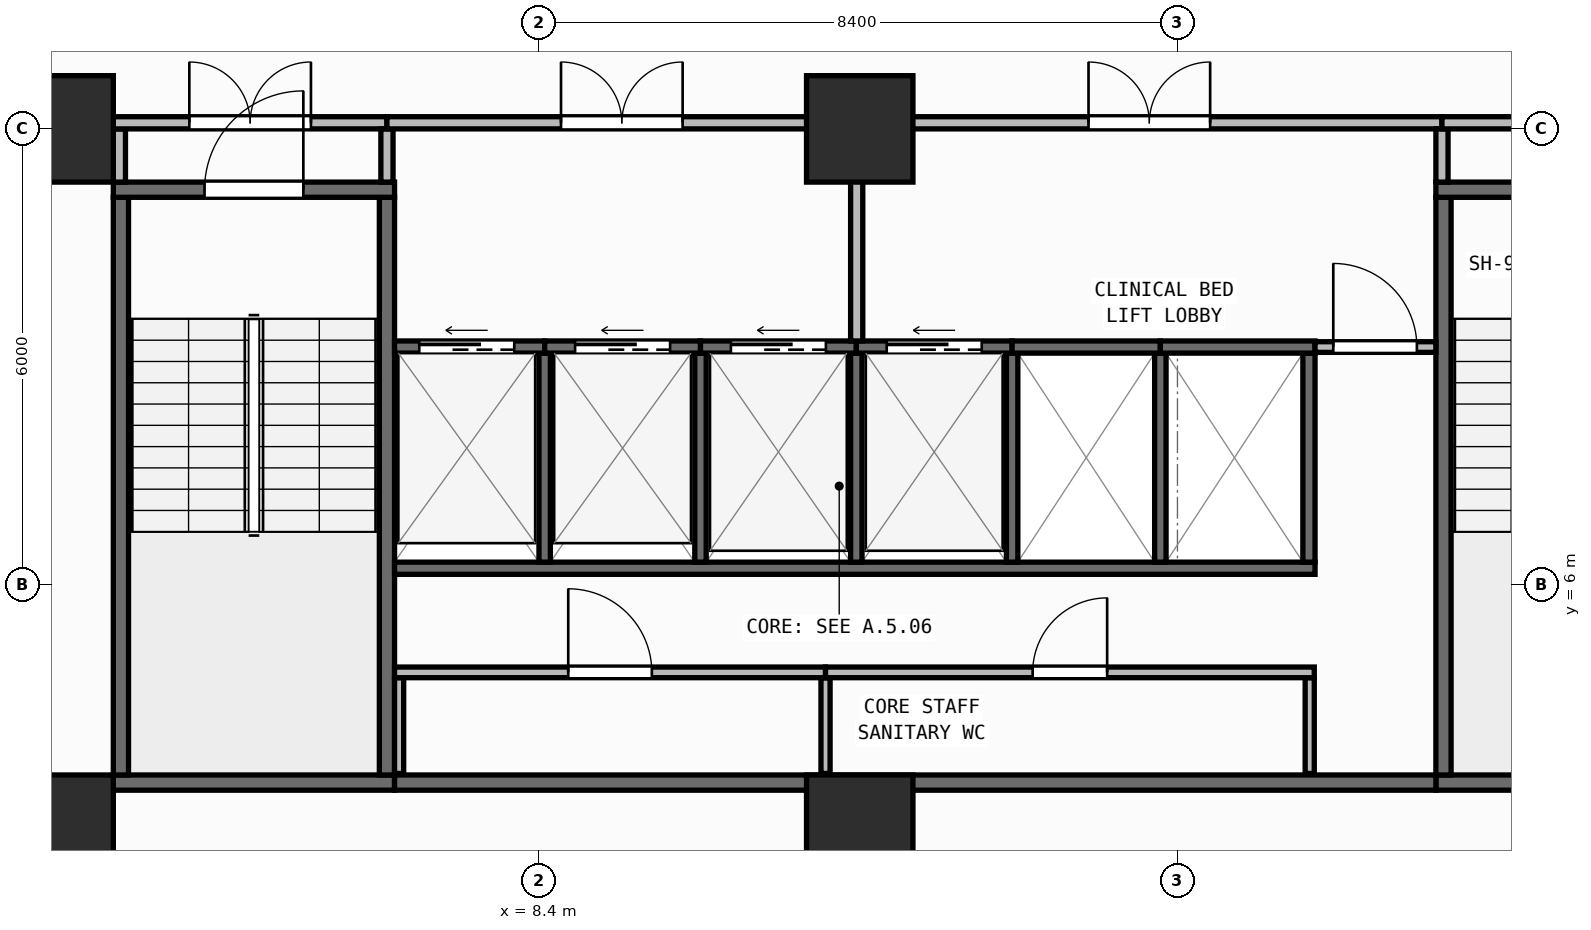
"""IFC4 building model, lengths in metres.
Left out: names, types, materials, properties, quantities, classifications, styles, units other than length and angle.
Written with IfcOpenShell. Run it as: python <this file> out.ifc"""

import sys

from ifc_helpers import new_model, si_unit, direction, frame, frame_2d, origin, origin_2d, place, context, subcontext, project, spatial, rectangle, extrude, element, fill, save


model = new_model("IFC4")
c1 = context("Model", 3, precision=1e-05, world=origin(), true_north=direction((0.0, 1.0)))
c2 = subcontext(c1, "Body", "Model", "MODEL_VIEW")
j1 = project(units=[si_unit("LENGTHUNIT", "METRE"), si_unit("PLANEANGLEUNIT", "RADIAN")], contexts=[c1])
p1 = place(None, origin())
s1 = spatial("IfcSite", under=j1, at=p1, CompositionType="ELEMENT")
p2 = place(p1, origin())
s2 = spatial("IfcBuilding", under=s1, at=p2, CompositionType="ELEMENT")
p3 = place(p2, frame((0.0, 0.0, 50.15)))
s3 = spatial("IfcBuildingStorey", under=s2, at=p3, CompositionType="ELEMENT", Elevation=50.15)
for number, where, z_axis, x_axis in (
    (1, (2.1, 2.8, 0.0), (0.0, 0.0, 1.0), (1.0, 0.0, 0.0)),
    (2, (12.62, 2.8, 0.0), (0.0, 0.0, 1.0), (1.0, 0.0, 0.0)),
    (3, (2.1, 12.0, 0.0), (0.0, 0.0, 1.0), (1.0, 0.0, 0.0)),
    (4, (12.62, 12.0, 0.0), (0.0, 0.0, 1.0), (1.0, 0.0, 0.0)),
):
    element("IfcColumn", number, at=place(p3, frame(where, z_axis=z_axis, x_axis=x_axis)), inside=s3, PredefinedType="COLUMN", context=c2, shape_type="SweptSolid", body=[
        extrude(rectangle(XDim=1.4, YDim=1.4, at=origin_2d()), origin(), (0.0, 0.0, 1.0), 3.95),
    ])
p4 = place(p3, frame((2.76, 0.174, 0.0), z_axis=(0.0, 0.0, 1.0), x_axis=(0.996571478456, 0.082736257641, 0.0)))
e5 = element("IfcWall", 5, at=p4, inside=s3, PredefinedType="STANDARD", context=c2, shape_type="SweptSolid", body=[
    extrude(rectangle(XDim=52.861, YDim=0.26, at=frame_2d((26.431, 0.0))), origin(), (0.0, 0.0, 1.0), 3.71),
])
p5 = place(p4, frame((25.231, 0.0, 0.9)))
e6 = element("IfcOpeningElement", 6, at=p5, cuts=e5, PredefinedType="OPENING", context=c2, shape_type="SweptSolid", body=[
    extrude(rectangle(XDim=2.4, YDim=1.65, at=frame_2d((1.2, 0.825))), frame((0.0, 0.14, 0.0), z_axis=(0.0, -1.0, 0.0), x_axis=(1.0, 0.0, 0.0)), (0.0, 0.0, 1.0), 0.28),
])
p6 = place(p3, frame((2.8, 3.4, 0.0), z_axis=(0.0, 0.0, 1.0), x_axis=(1.0, 0.0, 0.0)))
e7 = element("IfcWall", 7, at=p6, inside=s3, PredefinedType="SHEAR", context=c2, shape_type="SweptSolid", body=[
    extrude(rectangle(XDim=3.7, YDim=0.2, at=frame_2d((1.85, 0.0))), origin(), (0.0, 0.0, 1.0), 3.71),
])
for number, where, z_axis, x_axis in (
    (8, (2.9, 3.5, 0.0), (0.0, 0.0, 1.0), (0.0, 1.0, 0.0)),
    (9, (6.4, 3.5, 0.0), (0.0, 0.0, 1.0), (0.0, 1.0, 0.0)),
):
    element("IfcWall", number, at=place(p3, frame(where, z_axis=z_axis, x_axis=x_axis)), inside=s3, PredefinedType="SHEAR", context=c2, shape_type="SweptSolid", body=[
        extrude(rectangle(XDim=7.6, YDim=0.2, at=frame_2d((3.8, 0.0))), origin(), (0.0, 0.0, 1.0), 3.71),
    ])
p7 = place(p3, frame((2.8, 11.2, 0.0), z_axis=(0.0, 0.0, 1.0), x_axis=(1.0, 0.0, 0.0)))
e10 = element("IfcWall", 10, at=p7, inside=s3, PredefinedType="SHEAR", context=c2, shape_type="SweptSolid", body=[
    extrude(rectangle(XDim=3.7, YDim=0.2, at=frame_2d((1.85, 0.0))), origin(), (0.0, 0.0, 1.0), 3.71),
])
p8 = place(p7, frame((1.2, 0.0, 0.0)))
e11 = element("IfcOpeningElement", 11, at=p8, cuts=e10, PredefinedType="OPENING", context=c2, shape_type="SweptSolid", body=[
    extrude(rectangle(XDim=1.3, YDim=2.15, at=frame_2d((0.65, 1.075))), frame((0.0, 0.11, 0.0), z_axis=(0.0, -1.0, 0.0), x_axis=(1.0, 0.0, 0.0)), (0.0, 0.0, 1.0), 0.22),
])
p9 = place(p3, frame((20.2, 3.4, 0.0), z_axis=(0.0, 0.0, 1.0), x_axis=(1.0, 0.0, 0.0)))
e12 = element("IfcWall", 12, at=p9, inside=s3, PredefinedType="SHEAR", context=c2, shape_type="SweptSolid", body=[
    extrude(rectangle(XDim=3.7, YDim=0.2, at=frame_2d((1.85, 0.0))), origin(), (0.0, 0.0, 1.0), 3.71),
])
p10 = place(p3, frame((20.3, 3.5, 0.0), z_axis=(0.0, 0.0, 1.0), x_axis=(0.0, 1.0, 0.0)))
e13 = element("IfcWall", 13, at=p10, inside=s3, PredefinedType="SHEAR", context=c2, shape_type="SweptSolid", body=[
    extrude(rectangle(XDim=7.6, YDim=0.2, at=frame_2d((3.8, 0.0))), origin(), (0.0, 0.0, 1.0), 3.71),
])
p11 = place(p3, frame((20.2, 11.2, 0.0), z_axis=(0.0, 0.0, 1.0), x_axis=(1.0, 0.0, 0.0)))
e14 = element("IfcWall", 14, at=p11, inside=s3, PredefinedType="SHEAR", context=c2, shape_type="SweptSolid", body=[
    extrude(rectangle(XDim=3.7, YDim=0.2, at=frame_2d((1.85, 0.0))), origin(), (0.0, 0.0, 1.0), 3.71),
])
p12 = place(p11, frame((1.2, 0.0, 0.0)))
e15 = element("IfcOpeningElement", 15, at=p12, cuts=e14, PredefinedType="OPENING", context=c2, shape_type="SweptSolid", body=[
    extrude(rectangle(XDim=1.3, YDim=2.15, at=frame_2d((0.65, 1.075))), frame((0.0, 0.11, 0.0), z_axis=(0.0, -1.0, 0.0), x_axis=(1.0, 0.0, 0.0)), (0.0, 0.0, 1.0), 0.22),
])
p13 = place(p3, frame((6.5, 3.4, 0.0), z_axis=(0.0, 0.0, 1.0), x_axis=(1.0, 0.0, 0.0)))
e16 = element("IfcWall", 16, at=p13, inside=s3, PredefinedType="SHEAR", context=c2, shape_type="SweptSolid", body=[
    extrude(rectangle(XDim=13.7, YDim=0.2, at=frame_2d((6.85, 0.0))), origin(), (0.0, 0.0, 1.0), 3.71),
])
p14 = place(p3, frame((6.5, 6.22, 0.0), z_axis=(0.0, 0.0, 1.0), x_axis=(1.0, 0.0, 0.0)))
e17 = element("IfcWall", 17, at=p14, inside=s3, PredefinedType="SHEAR", context=c2, shape_type="SweptSolid", body=[
    extrude(rectangle(XDim=12.11, YDim=0.16, at=frame_2d((6.055, 0.0))), origin(), (0.0, 0.0, 1.0), 3.71),
])
p15 = place(p3, frame((18.53, 6.3, 0.0), z_axis=(0.0, 0.0, 1.0), x_axis=(0.0, 1.0, 0.0)))
e18 = element("IfcWall", 18, at=p15, inside=s3, PredefinedType="SHEAR", context=c2, shape_type="SweptSolid", body=[
    extrude(rectangle(XDim=2.75, YDim=0.16, at=frame_2d((1.375, 0.0))), origin(), (0.0, 0.0, 1.0), 3.71),
])
for number, where, z_axis, x_axis in (
    (19, (8.475, 6.3, 0.0), (0.0, 0.0, 1.0), (0.0, 1.0, 0.0)),
    (20, (10.525, 6.3, 0.0), (0.0, 0.0, 1.0), (0.0, 1.0, 0.0)),
    (21, (12.575, 6.3, 0.0), (0.0, 0.0, 1.0), (0.0, 1.0, 0.0)),
    (22, (14.625, 6.3, 0.0), (0.0, 0.0, 1.0), (0.0, 1.0, 0.0)),
    (23, (16.575, 6.3, 0.0), (0.0, 0.0, 1.0), (0.0, 1.0, 0.0)),
):
    element("IfcWall", number, at=place(p3, frame(where, z_axis=z_axis, x_axis=x_axis)), inside=s3, PredefinedType="SHEAR", context=c2, shape_type="SweptSolid", body=[
        extrude(rectangle(XDim=2.75, YDim=0.15, at=frame_2d((1.375, 0.0))), origin(), (0.0, 0.0, 1.0), 3.71),
    ])
p16 = place(p3, frame((6.5, 9.13, 0.0), z_axis=(0.0, 0.0, 1.0), x_axis=(1.0, 0.0, 0.0)))
e24 = element("IfcWall", 24, at=p16, inside=s3, PredefinedType="SHEAR", context=c2, shape_type="SweptSolid", body=[
    extrude(rectangle(XDim=1.975, YDim=0.16, at=frame_2d((0.988, 0.0))), origin(), (0.0, 0.0, 1.0), 3.71),
])
p17 = place(p16, frame((0.325, 0.0, 0.0)))
e25 = element("IfcOpeningElement", 25, at=p17, cuts=e24, PredefinedType="OPENING", context=c2, shape_type="SweptSolid", body=[
    extrude(rectangle(XDim=1.25, YDim=2.15, at=frame_2d((0.625, 1.075))), frame((0.0, 0.09, 0.0), z_axis=(0.0, -1.0, 0.0), x_axis=(1.0, 0.0, 0.0)), (0.0, 0.0, 1.0), 0.18),
])
p18 = place(p3, frame((8.475, 9.13, 0.0), z_axis=(0.0, 0.0, 1.0), x_axis=(1.0, 0.0, 0.0)))
e26 = element("IfcWall", 26, at=p18, inside=s3, PredefinedType="SHEAR", context=c2, shape_type="SweptSolid", body=[
    extrude(rectangle(XDim=2.05, YDim=0.16, at=frame_2d((1.025, 0.0))), origin(), (0.0, 0.0, 1.0), 3.71),
])
p19 = place(p18, frame((0.4, 0.0, 0.0)))
e27 = element("IfcOpeningElement", 27, at=p19, cuts=e26, PredefinedType="OPENING", context=c2, shape_type="SweptSolid", body=[
    extrude(rectangle(XDim=1.25, YDim=2.15, at=frame_2d((0.625, 1.075))), frame((0.0, 0.09, 0.0), z_axis=(0.0, -1.0, 0.0), x_axis=(1.0, 0.0, 0.0)), (0.0, 0.0, 1.0), 0.18),
])
p20 = place(p3, frame((10.525, 9.13, 0.0), z_axis=(0.0, 0.0, 1.0), x_axis=(1.0, 0.0, 0.0)))
e28 = element("IfcWall", 28, at=p20, inside=s3, PredefinedType="SHEAR", context=c2, shape_type="SweptSolid", body=[
    extrude(rectangle(XDim=2.05, YDim=0.16, at=frame_2d((1.025, 0.0))), origin(), (0.0, 0.0, 1.0), 3.71),
])
p21 = place(p20, frame((0.4, 0.0, 0.0)))
e29 = element("IfcOpeningElement", 29, at=p21, cuts=e28, PredefinedType="OPENING", context=c2, shape_type="SweptSolid", body=[
    extrude(rectangle(XDim=1.25, YDim=2.15, at=frame_2d((0.625, 1.075))), frame((0.0, 0.09, 0.0), z_axis=(0.0, -1.0, 0.0), x_axis=(1.0, 0.0, 0.0)), (0.0, 0.0, 1.0), 0.18),
])
p22 = place(p3, frame((12.575, 9.13, 0.0), z_axis=(0.0, 0.0, 1.0), x_axis=(1.0, 0.0, 0.0)))
e30 = element("IfcWall", 30, at=p22, inside=s3, PredefinedType="SHEAR", context=c2, shape_type="SweptSolid", body=[
    extrude(rectangle(XDim=2.05, YDim=0.16, at=frame_2d((1.025, 0.0))), origin(), (0.0, 0.0, 1.0), 3.71),
])
p23 = place(p22, frame((0.4, 0.0, 0.0)))
e31 = element("IfcOpeningElement", 31, at=p23, cuts=e30, PredefinedType="OPENING", context=c2, shape_type="SweptSolid", body=[
    extrude(rectangle(XDim=1.25, YDim=2.15, at=frame_2d((0.625, 1.075))), frame((0.0, 0.09, 0.0), z_axis=(0.0, -1.0, 0.0), x_axis=(1.0, 0.0, 0.0)), (0.0, 0.0, 1.0), 0.18),
])
p24 = place(p3, frame((14.625, 9.13, 0.0), z_axis=(0.0, 0.0, 1.0), x_axis=(1.0, 0.0, 0.0)))
e32 = element("IfcWall", 32, at=p24, inside=s3, PredefinedType="SHEAR", context=c2, shape_type="SweptSolid", body=[
    extrude(rectangle(XDim=1.95, YDim=0.16, at=frame_2d((0.975, 0.0))), origin(), (0.0, 0.0, 1.0), 3.71),
])
p25 = place(p3, frame((16.575, 9.13, 0.0), z_axis=(0.0, 0.0, 1.0), x_axis=(1.0, 0.0, 0.0)))
e33 = element("IfcWall", 33, at=p25, inside=s3, PredefinedType="SHEAR", context=c2, shape_type="SweptSolid", body=[
    extrude(rectangle(XDim=2.035, YDim=0.16, at=frame_2d((1.018, 0.0))), origin(), (0.0, 0.0, 1.0), 3.71),
])
for number, where, z_axis, x_axis in (
    (34, (6.56, 3.52, 0.0), (0.0, 0.0, 1.0), (0.0, 1.0, 0.0)),
    (35, (12.17, 3.52, 0.0), (0.0, 0.0, 1.0), (0.0, 1.0, 0.0)),
    (36, (18.54, 3.52, 0.0), (0.0, 0.0, 1.0), (0.0, 1.0, 0.0)),
):
    element("IfcWall", number, at=place(p3, frame(where, z_axis=z_axis, x_axis=x_axis)), inside=s3, PredefinedType="PARTITIONING", context=c2, shape_type="SweptSolid", body=[
        extrude(rectangle(XDim=1.26, YDim=0.12, at=frame_2d((0.63, 0.0))), origin(), (0.0, 0.0, 1.0), 3.71),
    ])
p26 = place(p3, frame((6.5, 4.85, 0.0), z_axis=(0.0, 0.0, 1.0), x_axis=(1.0, 0.0, 0.0)))
e37 = element("IfcWall", 37, at=p26, inside=s3, PredefinedType="PARTITIONING", context=c2, shape_type="SweptSolid", body=[
    extrude(rectangle(XDim=5.67, YDim=0.14, at=frame_2d((2.835, 0.0))), origin(), (0.0, 0.0, 1.0), 3.71),
])
p27 = place(p26, frame((2.285, 0.0, 0.0)))
e38 = element("IfcOpeningElement", 38, at=p27, cuts=e37, PredefinedType="OPENING", context=c2, shape_type="SweptSolid", body=[
    extrude(rectangle(XDim=1.1, YDim=2.1, at=frame_2d((0.55, 1.05))), frame((0.0, 0.08, 0.0), z_axis=(0.0, -1.0, 0.0), x_axis=(1.0, 0.0, 0.0)), (0.0, 0.0, 1.0), 0.16),
])
p28 = place(p3, frame((12.17, 4.85, 0.0), z_axis=(0.0, 0.0, 1.0), x_axis=(1.0, 0.0, 0.0)))
e39 = element("IfcWall", 39, at=p28, inside=s3, PredefinedType="PARTITIONING", context=c2, shape_type="SweptSolid", body=[
    extrude(rectangle(XDim=6.43, YDim=0.14, at=frame_2d((3.215, 0.0))), origin(), (0.0, 0.0, 1.0), 3.71),
])
p29 = place(p28, frame((2.725, 0.0, 0.0)))
e40 = element("IfcOpeningElement", 40, at=p29, cuts=e39, PredefinedType="OPENING", context=c2, shape_type="SweptSolid", body=[
    extrude(rectangle(XDim=0.98, YDim=2.1, at=frame_2d((0.49, 1.05))), frame((0.0, 0.08, 0.0), z_axis=(0.0, -1.0, 0.0), x_axis=(1.0, 0.0, 0.0)), (0.0, 0.0, 1.0), 0.16),
])
p30 = place(p3, frame((18.61, 9.13, 0.0), z_axis=(0.0, 0.0, 1.0), x_axis=(1.0, 0.0, 0.0)))
e41 = element("IfcWall", 41, at=p30, inside=s3, PredefinedType="PARTITIONING", context=c2, shape_type="SweptSolid", body=[
    extrude(rectangle(XDim=1.59, YDim=0.14, at=frame_2d((0.795, 0.0))), origin(), (0.0, 0.0, 1.0), 3.71),
])
p31 = place(p30, frame((0.24, 0.0, 0.0)))
e42 = element("IfcOpeningElement", 42, at=p31, cuts=e41, PredefinedType="OPENING", context=c2, shape_type="SweptSolid", body=[
    extrude(rectangle(XDim=1.1, YDim=2.1, at=frame_2d((0.55, 1.05))), frame((0.0, 0.08, 0.0), z_axis=(0.0, -1.0, 0.0), x_axis=(1.0, 0.0, 0.0)), (0.0, 0.0, 1.0), 0.16),
])
p32 = place(p3, frame((2.88, 11.3, 0.0), z_axis=(0.0, 0.0, 1.0), x_axis=(0.0, 1.0, 0.0)))
e43 = element("IfcWall", 43, at=p32, inside=s3, PredefinedType="PARTITIONING", context=c2, shape_type="SweptSolid", body=[
    extrude(rectangle(XDim=0.7, YDim=0.16, at=frame_2d((0.35, 0.0))), origin(), (0.0, 0.0, 1.0), 3.71),
])
p33 = place(p3, frame((2.8, 12.08, 0.0), z_axis=(0.0, 0.0, 1.0), x_axis=(1.0, 0.0, 0.0)))
e44 = element("IfcWall", 44, at=p33, inside=s3, PredefinedType="PARTITIONING", context=c2, shape_type="SweptSolid", body=[
    extrude(rectangle(XDim=3.6, YDim=0.16, at=frame_2d((1.8, 0.0))), origin(), (0.0, 0.0, 1.0), 3.073),
])
p34 = place(p33, frame((1.0, 0.0, 0.0)))
e45 = element("IfcOpeningElement", 45, at=p34, cuts=e44, PredefinedType="OPENING", context=c2, shape_type="SweptSolid", body=[
    extrude(rectangle(XDim=1.6, YDim=2.05, at=frame_2d((0.8, 1.025))), frame((0.0, 0.09, 0.0), z_axis=(0.0, -1.0, 0.0), x_axis=(1.0, 0.0, 0.0)), (0.0, 0.0, 1.0), 0.18),
])
p35 = place(p3, frame((6.4, 11.3, 0.0), z_axis=(0.0, 0.0, 1.0), x_axis=(0.0, 1.0, 0.0)))
e46 = element("IfcWall", 46, at=p35, inside=s3, PredefinedType="PARTITIONING", context=c2, shape_type="SweptSolid", body=[
    extrude(rectangle(XDim=0.7, YDim=0.16, at=frame_2d((0.35, 0.0))), origin(), (0.0, 0.0, 1.0), 3.71),
])
p36 = place(p3, frame((6.4, 12.08, 0.0), z_axis=(0.0, 0.0, 1.0), x_axis=(1.0, 0.0, 0.0)))
e47 = element("IfcWall", 47, at=p36, inside=s3, PredefinedType="PARTITIONING", context=c2, shape_type="SweptSolid", body=[
    extrude(rectangle(XDim=6.18, YDim=0.16, at=frame_2d((3.09, 0.0))), origin(), (0.0, 0.0, 1.0), 3.073),
])
p37 = place(p36, frame((2.29, 0.0, 0.0)))
e48 = element("IfcOpeningElement", 48, at=p37, cuts=e47, PredefinedType="OPENING", context=c2, shape_type="SweptSolid", body=[
    extrude(rectangle(XDim=1.6, YDim=2.05, at=frame_2d((0.8, 1.025))), frame((0.0, 0.09, 0.0), z_axis=(0.0, -1.0, 0.0), x_axis=(1.0, 0.0, 0.0)), (0.0, 0.0, 1.0), 0.18),
])
p38 = place(p3, frame((12.58, 9.21, 0.0), z_axis=(0.0, 0.0, 1.0), x_axis=(0.0, 1.0, 0.0)))
e49 = element("IfcWall", 49, at=p38, inside=s3, PredefinedType="PARTITIONING", context=c2, shape_type="SweptSolid", body=[
    extrude(rectangle(XDim=2.79, YDim=0.16, at=frame_2d((1.395, 0.0))), origin(), (0.0, 0.0, 1.0), 3.71),
])
p39 = place(p3, frame((12.58, 12.08, 0.0), z_axis=(0.0, 0.0, 1.0), x_axis=(1.0, 0.0, 0.0)))
e50 = element("IfcWall", 50, at=p39, inside=s3, PredefinedType="PARTITIONING", context=c2, shape_type="SweptSolid", body=[
    extrude(rectangle(XDim=7.7, YDim=0.16, at=frame_2d((3.85, 0.0))), origin(), (0.0, 0.0, 1.0), 3.073),
])
p40 = place(p39, frame((3.05, 0.0, 0.0)))
e51 = element("IfcOpeningElement", 51, at=p40, cuts=e50, PredefinedType="OPENING", context=c2, shape_type="SweptSolid", body=[
    extrude(rectangle(XDim=1.6, YDim=2.05, at=frame_2d((0.8, 1.025))), frame((0.0, 0.09, 0.0), z_axis=(0.0, -1.0, 0.0), x_axis=(1.0, 0.0, 0.0)), (0.0, 0.0, 1.0), 0.18),
])
p41 = place(p3, frame((20.28, 11.3, 0.0), z_axis=(0.0, 0.0, 1.0), x_axis=(0.0, 1.0, 0.0)))
e52 = element("IfcWall", 52, at=p41, inside=s3, PredefinedType="PARTITIONING", context=c2, shape_type="SweptSolid", body=[
    extrude(rectangle(XDim=0.7, YDim=0.16, at=frame_2d((0.35, 0.0))), origin(), (0.0, 0.0, 1.0), 3.71),
])
p42 = place(p3, frame((20.28, 12.08, 0.0), z_axis=(0.0, 0.0, 1.0), x_axis=(1.0, 0.0, 0.0)))
e53 = element("IfcWall", 53, at=p42, inside=s3, PredefinedType="PARTITIONING", context=c2, shape_type="SweptSolid", body=[
    extrude(rectangle(XDim=3.62, YDim=0.16, at=frame_2d((1.81, 0.0))), origin(), (0.0, 0.0, 1.0), 3.073),
])
p43 = place(p42, frame((1.01, 0.0, 0.0)))
e54 = element("IfcOpeningElement", 54, at=p43, cuts=e53, PredefinedType="OPENING", context=c2, shape_type="SweptSolid", body=[
    extrude(rectangle(XDim=1.6, YDim=2.05, at=frame_2d((0.8, 1.025))), frame((0.0, 0.09, 0.0), z_axis=(0.0, -1.0, 0.0), x_axis=(1.0, 0.0, 0.0)), (0.0, 0.0, 1.0), 0.18),
])
p44 = place(p8, origin())
e55 = element("IfcDoor", 55, at=p44, inside=s3, OperationType="SINGLE_SWING_RIGHT", PredefinedType="DOOR", context=c2, shape_type="SweptSolid", body=[
    extrude(rectangle(XDim=1.3, YDim=2.15, at=frame_2d((0.65, 1.075))), frame((0.0, 0.025, 0.0), z_axis=(0.0, -1.0, 0.0), x_axis=(1.0, 0.0, 0.0)), (0.0, 0.0, 1.0), 0.05),
])
fill(e11, e55)
p45 = place(p17, origin())
e56 = element("IfcDoor", 56, at=p45, inside=s3, OperationType="SLIDING_TO_LEFT", PredefinedType="DOOR", context=c2, shape_type="SweptSolid", body=[
    extrude(rectangle(XDim=1.25, YDim=2.15, at=frame_2d((0.625, 1.075))), frame((0.0, 0.025, 0.0), z_axis=(0.0, -1.0, 0.0), x_axis=(1.0, 0.0, 0.0)), (0.0, 0.0, 1.0), 0.05),
])
fill(e25, e56)
p46 = place(p19, origin())
e57 = element("IfcDoor", 57, at=p46, inside=s3, OperationType="SLIDING_TO_LEFT", PredefinedType="DOOR", context=c2, shape_type="SweptSolid", body=[
    extrude(rectangle(XDim=1.25, YDim=2.15, at=frame_2d((0.625, 1.075))), frame((0.0, 0.025, 0.0), z_axis=(0.0, -1.0, 0.0), x_axis=(1.0, 0.0, 0.0)), (0.0, 0.0, 1.0), 0.05),
])
fill(e27, e57)
p47 = place(p21, origin())
e58 = element("IfcDoor", 58, at=p47, inside=s3, OperationType="SLIDING_TO_LEFT", PredefinedType="DOOR", context=c2, shape_type="SweptSolid", body=[
    extrude(rectangle(XDim=1.25, YDim=2.15, at=frame_2d((0.625, 1.075))), frame((0.0, 0.025, 0.0), z_axis=(0.0, -1.0, 0.0), x_axis=(1.0, 0.0, 0.0)), (0.0, 0.0, 1.0), 0.05),
])
fill(e29, e58)
p48 = place(p23, origin())
e59 = element("IfcDoor", 59, at=p48, inside=s3, OperationType="SLIDING_TO_LEFT", PredefinedType="DOOR", context=c2, shape_type="SweptSolid", body=[
    extrude(rectangle(XDim=1.25, YDim=2.15, at=frame_2d((0.625, 1.075))), frame((0.0, 0.025, 0.0), z_axis=(0.0, -1.0, 0.0), x_axis=(1.0, 0.0, 0.0)), (0.0, 0.0, 1.0), 0.05),
])
fill(e31, e59)
p49 = place(p27, origin())
e60 = element("IfcDoor", 60, at=p49, inside=s3, OperationType="SINGLE_SWING_LEFT", PredefinedType="DOOR", context=c2, shape_type="SweptSolid", body=[
    extrude(rectangle(XDim=1.1, YDim=2.1, at=frame_2d((0.55, 1.05))), frame((0.0, 0.025, 0.0), z_axis=(0.0, -1.0, 0.0), x_axis=(1.0, 0.0, 0.0)), (0.0, 0.0, 1.0), 0.05),
])
fill(e38, e60)
p50 = place(p29, origin())
e61 = element("IfcDoor", 61, at=p50, inside=s3, OperationType="SINGLE_SWING_RIGHT", PredefinedType="DOOR", context=c2, shape_type="SweptSolid", body=[
    extrude(rectangle(XDim=0.98, YDim=2.1, at=frame_2d((0.49, 1.05))), frame((0.0, 0.025, 0.0), z_axis=(0.0, -1.0, 0.0), x_axis=(1.0, 0.0, 0.0)), (0.0, 0.0, 1.0), 0.05),
])
fill(e40, e61)
p51 = place(p31, origin())
e62 = element("IfcDoor", 62, at=p51, inside=s3, OperationType="SINGLE_SWING_LEFT", PredefinedType="DOOR", context=c2, shape_type="SweptSolid", body=[
    extrude(rectangle(XDim=1.1, YDim=2.1, at=frame_2d((0.55, 1.05))), frame((0.0, 0.025, 0.0), z_axis=(0.0, -1.0, 0.0), x_axis=(1.0, 0.0, 0.0)), (0.0, 0.0, 1.0), 0.05),
])
fill(e42, e62)
p52 = place(p34, origin())
e63 = element("IfcDoor", 63, at=p52, inside=s3, OperationType="DOUBLE_DOOR_SINGLE_SWING", PredefinedType="DOOR", context=c2, shape_type="SweptSolid", body=[
    extrude(rectangle(XDim=1.6, YDim=2.05, at=frame_2d((0.8, 1.025))), frame((0.0, 0.025, 0.0), z_axis=(0.0, -1.0, 0.0), x_axis=(1.0, 0.0, 0.0)), (0.0, 0.0, 1.0), 0.05),
])
fill(e45, e63)
p53 = place(p37, origin())
e64 = element("IfcDoor", 64, at=p53, inside=s3, OperationType="DOUBLE_DOOR_SINGLE_SWING", PredefinedType="DOOR", context=c2, shape_type="SweptSolid", body=[
    extrude(rectangle(XDim=1.6, YDim=2.05, at=frame_2d((0.8, 1.025))), frame((0.0, 0.025, 0.0), z_axis=(0.0, -1.0, 0.0), x_axis=(1.0, 0.0, 0.0)), (0.0, 0.0, 1.0), 0.05),
])
fill(e48, e64)
p54 = place(p40, origin())
e65 = element("IfcDoor", 65, at=p54, inside=s3, OperationType="DOUBLE_DOOR_SINGLE_SWING", PredefinedType="DOOR", context=c2, shape_type="SweptSolid", body=[
    extrude(rectangle(XDim=1.6, YDim=2.05, at=frame_2d((0.8, 1.025))), frame((0.0, 0.025, 0.0), z_axis=(0.0, -1.0, 0.0), x_axis=(1.0, 0.0, 0.0)), (0.0, 0.0, 1.0), 0.05),
])
fill(e51, e65)
save(model, sys.argv[1])
